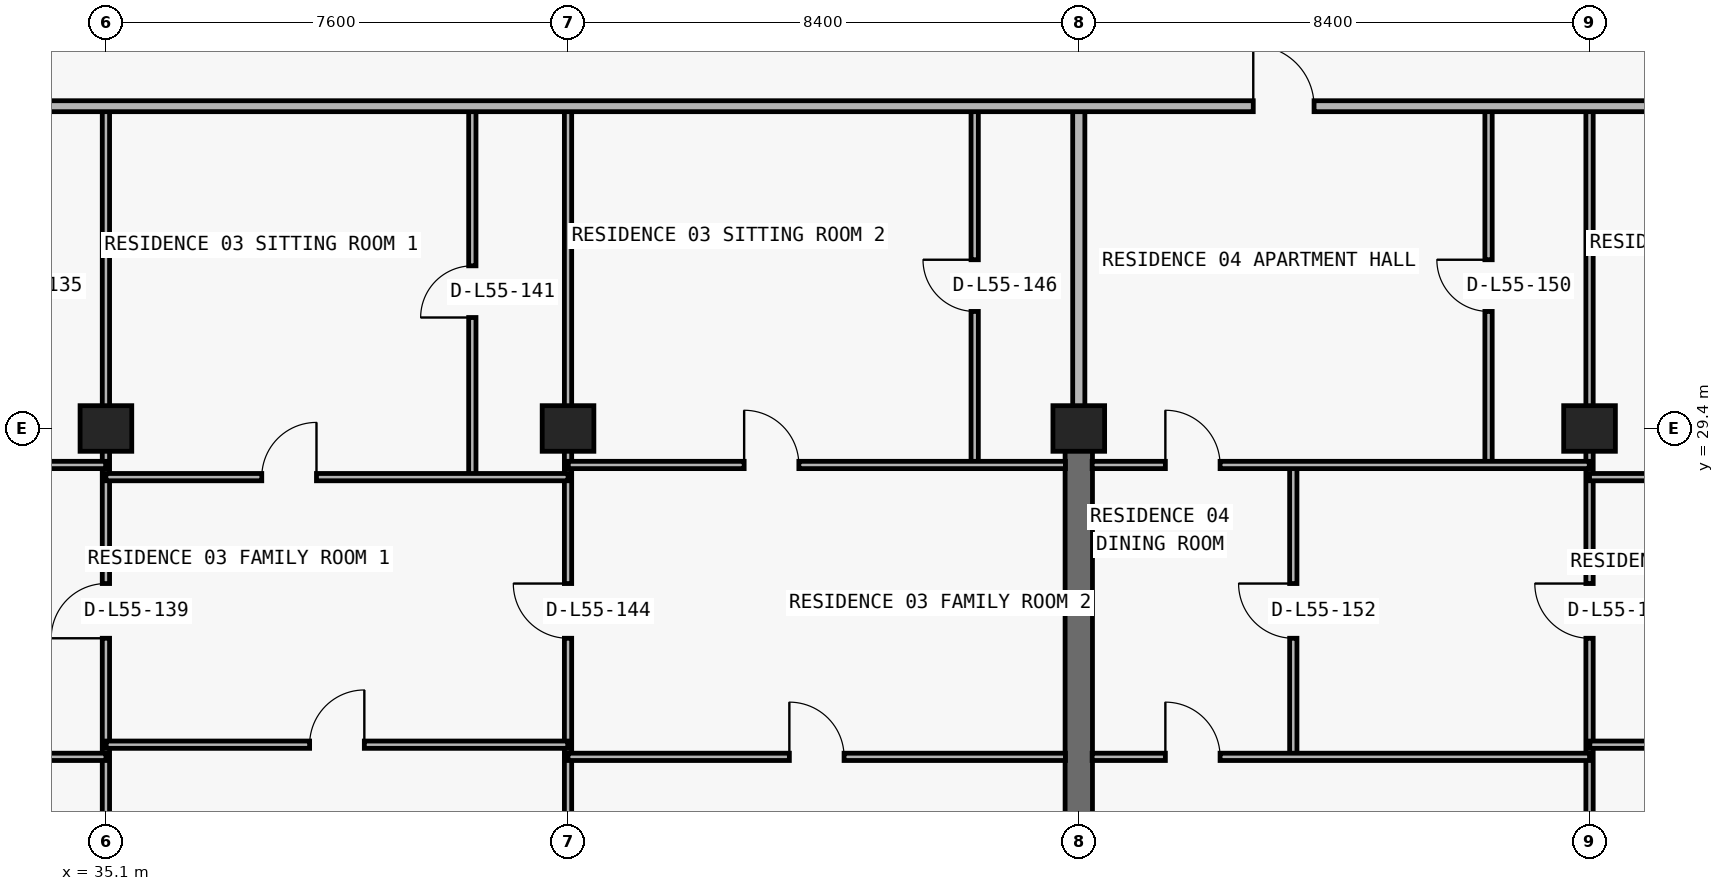
"""IFC4 building model, lengths in metres.
Left out: names, types, materials, properties, quantities, classifications, styles, units other than length and angle.
Written with IfcOpenShell. Run it as: python <this file> out.ifc"""

import sys

from ifc_helpers import new_model, si_unit, direction, frame, frame_2d, origin, origin_2d, place, context, subcontext, project, spatial, rectangle, extrude, element, fill, save


model = new_model("IFC4")
c1 = context("Model", 3, precision=1e-05, world=origin(), true_north=direction((0.0, 1.0)))
c2 = subcontext(c1, "Body", "Model", "MODEL_VIEW")
j1 = project(units=[si_unit("LENGTHUNIT", "METRE"), si_unit("PLANEANGLEUNIT", "RADIAN")], contexts=[c1])
p1 = place(None, origin())
s1 = spatial("IfcSite", under=j1, at=p1, CompositionType="ELEMENT")
p2 = place(p1, origin())
s2 = spatial("IfcBuilding", under=s1, at=p2, CompositionType="ELEMENT")
p3 = place(p2, frame((0.0, 0.0, 198.3)))
s3 = spatial("IfcBuildingStorey", under=s2, at=p3, CompositionType="ELEMENT", Elevation=198.3)
for number, where, z_axis, x_axis in (
    (1, (35.1, 29.4, 0.0), (0.0, 0.0, 1.0), (1.0, 0.0, 0.0)),
    (2, (42.7, 29.4, 0.0), (0.0, 0.0, 1.0), (1.0, 0.0, 0.0)),
    (3, (51.1, 29.4, 0.0), (0.0, 0.0, 1.0), (1.0, 0.0, 0.0)),
    (4, (59.5, 29.4, 0.0), (0.0, 0.0, 1.0), (1.0, 0.0, 0.0)),
):
    element("IfcColumn", number, at=place(p3, frame(where, z_axis=z_axis, x_axis=x_axis)), inside=s3, PredefinedType="COLUMN", context=c2, shape_type="SweptSolid", body=[
        extrude(rectangle(XDim=0.85, YDim=0.75, at=origin_2d()), origin(), (0.0, 0.0, 1.0), 3.05),
    ])
p4 = place(p3, frame((51.1, 20.8, 0.0), z_axis=(0.0, 0.0, 1.0), x_axis=(0.0, 1.0, 0.0)))
e5 = element("IfcWall", 5, at=p4, inside=s3, PredefinedType="SHEAR", context=c2, shape_type="SweptSolid", body=[
    extrude(rectangle(XDim=8.6, YDim=0.45, at=frame_2d((4.3, 0.0))), origin(), (0.0, 0.0, 1.0), 3.05),
])
p5 = place(p3, frame((35.1, 11.24, 0.0), z_axis=(0.0, 0.0, 1.0), x_axis=(0.0, 1.0, 0.0)))
e6 = element("IfcWall", 6, at=p5, inside=s3, PredefinedType="PARTITIONING", context=c2, shape_type="SweptSolid", body=[
    extrude(rectangle(XDim=23.46, YDim=0.12, at=frame_2d((11.73, 0.0))), origin(), (0.0, 0.0, 1.0), 2.263),
])
p6 = place(p5, frame((14.71, 0.0, 0.0)))
e7 = element("IfcOpeningElement", 7, at=p6, cuts=e6, PredefinedType="OPENING", context=c2, shape_type="SweptSolid", body=[
    extrude(rectangle(XDim=0.9, YDim=2.15, at=frame_2d((0.45, 1.075))), frame((0.0, 0.07, 0.0), z_axis=(0.0, -1.0, 0.0), x_axis=(1.0, 0.0, 0.0)), (0.0, 0.0, 1.0), 0.14),
])
p7 = place(p3, frame((41.126, 28.6, 0.0), z_axis=(0.0, 0.0, 1.0), x_axis=(0.0, 1.0, 0.0)))
e8 = element("IfcWall", 8, at=p7, inside=s3, PredefinedType="PARTITIONING", context=c2, shape_type="SweptSolid", body=[
    extrude(rectangle(XDim=6.1, YDim=0.12, at=frame_2d((3.05, 0.0))), origin(), (0.0, 0.0, 1.0), 3.05),
])
p8 = place(p7, frame((2.625, 0.0, 0.0)))
e9 = element("IfcOpeningElement", 9, at=p8, cuts=e8, PredefinedType="OPENING", context=c2, shape_type="SweptSolid", body=[
    extrude(rectangle(XDim=0.85, YDim=2.1, at=frame_2d((0.425, 1.05))), frame((0.0, 0.07, 0.0), z_axis=(0.0, -1.0, 0.0), x_axis=(1.0, 0.0, 0.0)), (0.0, 0.0, 1.0), 0.14),
])
p9 = place(p3, frame((42.7, 11.24, 0.0), z_axis=(0.0, 0.0, 1.0), x_axis=(0.0, 1.0, 0.0)))
e10 = element("IfcWall", 10, at=p9, inside=s3, PredefinedType="PARTITIONING", context=c2, shape_type="SweptSolid", body=[
    extrude(rectangle(XDim=23.46, YDim=0.12, at=frame_2d((11.73, 0.0))), origin(), (0.0, 0.0, 1.0), 2.263),
])
p10 = place(p9, frame((14.71, 0.0, 0.0)))
e11 = element("IfcOpeningElement", 11, at=p10, cuts=e10, PredefinedType="OPENING", context=c2, shape_type="SweptSolid", body=[
    extrude(rectangle(XDim=0.9, YDim=2.15, at=frame_2d((0.45, 1.075))), frame((0.0, 0.07, 0.0), z_axis=(0.0, -1.0, 0.0), x_axis=(1.0, 0.0, 0.0)), (0.0, 0.0, 1.0), 0.14),
])
p11 = place(p3, frame((49.388, 28.8, 0.0), z_axis=(0.0, 0.0, 1.0), x_axis=(0.0, 1.0, 0.0)))
e12 = element("IfcWall", 12, at=p11, inside=s3, PredefinedType="PARTITIONING", context=c2, shape_type="SweptSolid", body=[
    extrude(rectangle(XDim=5.9, YDim=0.12, at=frame_2d((2.95, 0.0))), origin(), (0.0, 0.0, 1.0), 3.05),
])
p12 = place(p11, frame((2.525, 0.0, 0.0)))
e13 = element("IfcOpeningElement", 13, at=p12, cuts=e12, PredefinedType="OPENING", context=c2, shape_type="SweptSolid", body=[
    extrude(rectangle(XDim=0.85, YDim=2.1, at=frame_2d((0.425, 1.05))), frame((0.0, 0.07, 0.0), z_axis=(0.0, -1.0, 0.0), x_axis=(1.0, 0.0, 0.0)), (0.0, 0.0, 1.0), 0.14),
])
p13 = place(p3, frame((51.1, 29.405, 0.0), z_axis=(0.0, 0.0, 1.0), x_axis=(0.0, 1.0, 0.0)))
e14 = element("IfcWall", 14, at=p13, inside=s3, PredefinedType="PARTITIONING", context=c2, shape_type="SweptSolid", body=[
    extrude(rectangle(XDim=5.295, YDim=0.2, at=frame_2d((2.647, 0.0))), origin(), (0.0, 0.0, 1.0), 2.335),
])
p14 = place(p3, frame((54.628, 24.0, 0.0), z_axis=(0.0, 0.0, 1.0), x_axis=(0.0, 1.0, 0.0)))
e15 = element("IfcWall", 15, at=p14, inside=s3, PredefinedType="PARTITIONING", context=c2, shape_type="SweptSolid", body=[
    extrude(rectangle(XDim=4.8, YDim=0.12, at=frame_2d((2.4, 0.0))), origin(), (0.0, 0.0, 1.0), 3.05),
])
p15 = place(p14, frame((1.95, 0.0, 0.0)))
e16 = element("IfcOpeningElement", 16, at=p15, cuts=e15, PredefinedType="OPENING", context=c2, shape_type="SweptSolid", body=[
    extrude(rectangle(XDim=0.9, YDim=2.15, at=frame_2d((0.45, 1.075))), frame((0.0, 0.07, 0.0), z_axis=(0.0, -1.0, 0.0), x_axis=(1.0, 0.0, 0.0)), (0.0, 0.0, 1.0), 0.14),
])
p16 = place(p3, frame((57.839, 28.8, 0.0), z_axis=(0.0, 0.0, 1.0), x_axis=(0.0, 1.0, 0.0)))
e17 = element("IfcWall", 17, at=p16, inside=s3, PredefinedType="PARTITIONING", context=c2, shape_type="SweptSolid", body=[
    extrude(rectangle(XDim=5.9, YDim=0.12, at=frame_2d((2.95, 0.0))), origin(), (0.0, 0.0, 1.0), 3.05),
])
p17 = place(p16, frame((2.525, 0.0, 0.0)))
e18 = element("IfcOpeningElement", 18, at=p17, cuts=e17, PredefinedType="OPENING", context=c2, shape_type="SweptSolid", body=[
    extrude(rectangle(XDim=0.85, YDim=2.1, at=frame_2d((0.425, 1.05))), frame((0.0, 0.07, 0.0), z_axis=(0.0, -1.0, 0.0), x_axis=(1.0, 0.0, 0.0)), (0.0, 0.0, 1.0), 0.14),
])
p18 = place(p3, frame((59.5, 11.24, 0.0), z_axis=(0.0, 0.0, 1.0), x_axis=(0.0, 1.0, 0.0)))
e19 = element("IfcWall", 19, at=p18, inside=s3, PredefinedType="PARTITIONING", context=c2, shape_type="SweptSolid", body=[
    extrude(rectangle(XDim=23.46, YDim=0.12, at=frame_2d((11.73, 0.0))), origin(), (0.0, 0.0, 1.0), 2.263),
])
p19 = place(p18, frame((14.71, 0.0, 0.0)))
e20 = element("IfcOpeningElement", 20, at=p19, cuts=e19, PredefinedType="OPENING", context=c2, shape_type="SweptSolid", body=[
    extrude(rectangle(XDim=0.9, YDim=2.15, at=frame_2d((0.45, 1.075))), frame((0.0, 0.07, 0.0), z_axis=(0.0, -1.0, 0.0), x_axis=(1.0, 0.0, 0.0)), (0.0, 0.0, 1.0), 0.14),
])
p20 = place(p3, frame((26.92, 24.0, 0.0), z_axis=(0.0, 0.0, 1.0), x_axis=(1.0, 0.0, 0.0)))
e21 = element("IfcWall", 21, at=p20, inside=s3, PredefinedType="PARTITIONING", context=c2, shape_type="SweptSolid", body=[
    extrude(rectangle(XDim=8.18, YDim=0.12, at=frame_2d((4.09, 0.0))), origin(), (0.0, 0.0, 1.0), 3.05),
])
p21 = place(p20, frame((1.33, 0.0, 0.0)))
e22 = element("IfcOpeningElement", 22, at=p21, cuts=e21, PredefinedType="OPENING", context=c2, shape_type="SweptSolid", body=[
    extrude(rectangle(XDim=0.9, YDim=2.15, at=frame_2d((0.45, 1.075))), frame((0.0, 0.07, 0.0), z_axis=(0.0, -1.0, 0.0), x_axis=(1.0, 0.0, 0.0)), (0.0, 0.0, 1.0), 0.14),
])
p22 = place(p3, frame((42.7, 24.0, 0.0), z_axis=(0.0, 0.0, 1.0), x_axis=(1.0, 0.0, 0.0)))
e23 = element("IfcWall", 23, at=p22, inside=s3, PredefinedType="PARTITIONING", context=c2, shape_type="SweptSolid", body=[
    extrude(rectangle(XDim=8.18, YDim=0.12, at=frame_2d((4.09, 0.0))), origin(), (0.0, 0.0, 1.0), 3.05),
])
p23 = place(p22, frame((3.64, 0.0, 0.0)))
e24 = element("IfcOpeningElement", 24, at=p23, cuts=e23, PredefinedType="OPENING", context=c2, shape_type="SweptSolid", body=[
    extrude(rectangle(XDim=0.9, YDim=2.15, at=frame_2d((0.45, 1.075))), frame((0.0, 0.07, 0.0), z_axis=(0.0, -1.0, 0.0), x_axis=(1.0, 0.0, 0.0)), (0.0, 0.0, 1.0), 0.14),
])
p24 = place(p3, frame((51.32, 24.0, 0.0), z_axis=(0.0, 0.0, 1.0), x_axis=(1.0, 0.0, 0.0)))
e25 = element("IfcWall", 25, at=p24, inside=s3, PredefinedType="PARTITIONING", context=c2, shape_type="SweptSolid", body=[
    extrude(rectangle(XDim=8.18, YDim=0.12, at=frame_2d((4.09, 0.0))), origin(), (0.0, 0.0, 1.0), 3.05),
])
p25 = place(p24, frame((1.204, 0.0, 0.0)))
e26 = element("IfcOpeningElement", 26, at=p25, cuts=e25, PredefinedType="OPENING", context=c2, shape_type="SweptSolid", body=[
    extrude(rectangle(XDim=0.9, YDim=2.15, at=frame_2d((0.45, 1.075))), frame((0.0, 0.07, 0.0), z_axis=(0.0, -1.0, 0.0), x_axis=(1.0, 0.0, 0.0)), (0.0, 0.0, 1.0), 0.14),
])
p26 = place(p3, frame((35.105, 24.2, 0.0), z_axis=(0.0, 0.0, 1.0), x_axis=(1.0, 0.0, 0.0)))
e27 = element("IfcWall", 27, at=p26, inside=s3, PredefinedType="PARTITIONING", context=c2, shape_type="SweptSolid", body=[
    extrude(rectangle(XDim=7.59, YDim=0.12, at=frame_2d((3.795, 0.0))), origin(), (0.0, 0.0, 1.0), 3.05),
])
p27 = place(p26, frame((3.345, 0.0, 0.0)))
e28 = element("IfcOpeningElement", 28, at=p27, cuts=e27, PredefinedType="OPENING", context=c2, shape_type="SweptSolid", body=[
    extrude(rectangle(XDim=0.9, YDim=2.15, at=frame_2d((0.45, 1.075))), frame((0.0, 0.07, 0.0), z_axis=(0.0, -1.0, 0.0), x_axis=(1.0, 0.0, 0.0)), (0.0, 0.0, 1.0), 0.14),
])
p28 = place(p3, frame((59.505, 24.2, 0.0), z_axis=(0.0, 0.0, 1.0), x_axis=(1.0, 0.0, 0.0)))
e29 = element("IfcWall", 29, at=p28, inside=s3, PredefinedType="PARTITIONING", context=c2, shape_type="SweptSolid", body=[
    extrude(rectangle(XDim=8.195, YDim=0.12, at=frame_2d((4.098, 0.0))), origin(), (0.0, 0.0, 1.0), 3.05),
])
p29 = place(p28, frame((3.647, 0.0, 0.0)))
e30 = element("IfcOpeningElement", 30, at=p29, cuts=e29, PredefinedType="OPENING", context=c2, shape_type="SweptSolid", body=[
    extrude(rectangle(XDim=0.9, YDim=2.15, at=frame_2d((0.45, 1.075))), frame((0.0, 0.07, 0.0), z_axis=(0.0, -1.0, 0.0), x_axis=(1.0, 0.0, 0.0)), (0.0, 0.0, 1.0), 0.14),
])
p30 = place(p3, frame((35.1, 28.6, 0.0), z_axis=(0.0, 0.0, 1.0), x_axis=(1.0, 0.0, 0.0)))
e31 = element("IfcWall", 31, at=p30, inside=s3, PredefinedType="PARTITIONING", context=c2, shape_type="SweptSolid", body=[
    extrude(rectangle(XDim=7.6, YDim=0.12, at=frame_2d((3.8, 0.0))), origin(), (0.0, 0.0, 1.0), 3.05),
])
p31 = place(p30, frame((2.563, 0.0, 0.0)))
e32 = element("IfcOpeningElement", 32, at=p31, cuts=e31, PredefinedType="OPENING", context=c2, shape_type="SweptSolid", body=[
    extrude(rectangle(XDim=0.9, YDim=2.15, at=frame_2d((0.45, 1.075))), frame((0.0, 0.07, 0.0), z_axis=(0.0, -1.0, 0.0), x_axis=(1.0, 0.0, 0.0)), (0.0, 0.0, 1.0), 0.14),
])
p32 = place(p3, frame((59.5, 28.6, 0.0), z_axis=(0.0, 0.0, 1.0), x_axis=(1.0, 0.0, 0.0)))
e33 = element("IfcWall", 33, at=p32, inside=s3, PredefinedType="PARTITIONING", context=c2, shape_type="SweptSolid", body=[
    extrude(rectangle(XDim=8.2, YDim=0.12, at=frame_2d((4.1, 0.0))), origin(), (0.0, 0.0, 1.0), 3.05),
])
p33 = place(p32, frame((2.822, 0.0, 0.0)))
e34 = element("IfcOpeningElement", 34, at=p33, cuts=e33, PredefinedType="OPENING", context=c2, shape_type="SweptSolid", body=[
    extrude(rectangle(XDim=0.9, YDim=2.15, at=frame_2d((0.45, 1.075))), frame((0.0, 0.07, 0.0), z_axis=(0.0, -1.0, 0.0), x_axis=(1.0, 0.0, 0.0)), (0.0, 0.0, 1.0), 0.14),
])
p34 = place(p3, frame((26.92, 28.8, 0.0), z_axis=(0.0, 0.0, 1.0), x_axis=(1.0, 0.0, 0.0)))
e35 = element("IfcWall", 35, at=p34, inside=s3, PredefinedType="PARTITIONING", context=c2, shape_type="SweptSolid", body=[
    extrude(rectangle(XDim=8.175, YDim=0.12, at=frame_2d((4.087, 0.0))), origin(), (0.0, 0.0, 1.0), 3.05),
])
p35 = place(p34, frame((1.33, 0.0, 0.0)))
e36 = element("IfcOpeningElement", 36, at=p35, cuts=e35, PredefinedType="OPENING", context=c2, shape_type="SweptSolid", body=[
    extrude(rectangle(XDim=0.9, YDim=2.15, at=frame_2d((0.45, 1.075))), frame((0.0, 0.07, 0.0), z_axis=(0.0, -1.0, 0.0), x_axis=(1.0, 0.0, 0.0)), (0.0, 0.0, 1.0), 0.14),
])
p36 = place(p3, frame((42.705, 28.8, 0.0), z_axis=(0.0, 0.0, 1.0), x_axis=(1.0, 0.0, 0.0)))
e37 = element("IfcWall", 37, at=p36, inside=s3, PredefinedType="PARTITIONING", context=c2, shape_type="SweptSolid", body=[
    extrude(rectangle(XDim=8.175, YDim=0.12, at=frame_2d((4.087, 0.0))), origin(), (0.0, 0.0, 1.0), 3.05),
])
p37 = place(p36, frame((2.892, 0.0, 0.0)))
e38 = element("IfcOpeningElement", 38, at=p37, cuts=e37, PredefinedType="OPENING", context=c2, shape_type="SweptSolid", body=[
    extrude(rectangle(XDim=0.9, YDim=2.15, at=frame_2d((0.45, 1.075))), frame((0.0, 0.07, 0.0), z_axis=(0.0, -1.0, 0.0), x_axis=(1.0, 0.0, 0.0)), (0.0, 0.0, 1.0), 0.14),
])
p38 = place(p3, frame((51.32, 28.8, 0.0), z_axis=(0.0, 0.0, 1.0), x_axis=(1.0, 0.0, 0.0)))
e39 = element("IfcWall", 39, at=p38, inside=s3, PredefinedType="PARTITIONING", context=c2, shape_type="SweptSolid", body=[
    extrude(rectangle(XDim=8.175, YDim=0.12, at=frame_2d((4.087, 0.0))), origin(), (0.0, 0.0, 1.0), 3.05),
])
p39 = place(p38, frame((1.204, 0.0, 0.0)))
e40 = element("IfcOpeningElement", 40, at=p39, cuts=e39, PredefinedType="OPENING", context=c2, shape_type="SweptSolid", body=[
    extrude(rectangle(XDim=0.9, YDim=2.15, at=frame_2d((0.45, 1.075))), frame((0.0, 0.07, 0.0), z_axis=(0.0, -1.0, 0.0), x_axis=(1.0, 0.0, 0.0)), (0.0, 0.0, 1.0), 0.14),
])
p40 = place(p3, frame((10.105, 34.7, 0.0), z_axis=(0.0, 0.0, 1.0), x_axis=(1.0, 0.0, 0.0)))
e41 = element("IfcWall", 41, at=p40, inside=s3, PredefinedType="PARTITIONING", context=c2, shape_type="SweptSolid", body=[
    extrude(rectangle(XDim=57.595, YDim=0.18, at=frame_2d((28.797, 0.0))), origin(), (0.0, 0.0, 1.0), 3.05),
])
p41 = place(p40, frame((2.365, 0.0, 0.0)))
e42 = element("IfcOpeningElement", 42, at=p41, cuts=e41, PredefinedType="OPENING", context=c2, shape_type="SweptSolid", body=[
    extrude(rectangle(XDim=1.0, YDim=2.2, at=frame_2d((0.5, 1.1))), frame((0.0, 0.1, 0.0), z_axis=(0.0, -1.0, 0.0), x_axis=(1.0, 0.0, 0.0)), (0.0, 0.0, 1.0), 0.2),
])
p42 = place(p40, frame((10.833, 0.0, 0.0)))
e43 = element("IfcOpeningElement", 43, at=p42, cuts=e41, PredefinedType="OPENING", context=c2, shape_type="SweptSolid", body=[
    extrude(rectangle(XDim=1.0, YDim=2.2, at=frame_2d((0.5, 1.1))), frame((0.0, 0.1, 0.0), z_axis=(0.0, -1.0, 0.0), x_axis=(1.0, 0.0, 0.0)), (0.0, 0.0, 1.0), 0.2),
])
p43 = place(p40, frame((19.422, 0.0, 0.0)))
e44 = element("IfcOpeningElement", 44, at=p43, cuts=e41, PredefinedType="OPENING", context=c2, shape_type="SweptSolid", body=[
    extrude(rectangle(XDim=1.0, YDim=2.2, at=frame_2d((0.5, 1.1))), frame((0.0, 0.1, 0.0), z_axis=(0.0, -1.0, 0.0), x_axis=(1.0, 0.0, 0.0)), (0.0, 0.0, 1.0), 0.2),
])
p44 = place(p40, frame((43.865, 0.0, 0.0)))
e45 = element("IfcOpeningElement", 45, at=p44, cuts=e41, PredefinedType="OPENING", context=c2, shape_type="SweptSolid", body=[
    extrude(rectangle(XDim=1.0, YDim=2.2, at=frame_2d((0.5, 1.1))), frame((0.0, 0.1, 0.0), z_axis=(0.0, -1.0, 0.0), x_axis=(1.0, 0.0, 0.0)), (0.0, 0.0, 1.0), 0.2),
])
p45 = place(p6, origin())
e46 = element("IfcDoor", 46, at=p45, inside=s3, OperationType="SINGLE_SWING_LEFT", PredefinedType="DOOR", context=c2, shape_type="SweptSolid", body=[
    extrude(rectangle(XDim=0.9, YDim=2.15, at=frame_2d((0.45, 1.075))), frame((0.0, 0.025, 0.0), z_axis=(0.0, -1.0, 0.0), x_axis=(1.0, 0.0, 0.0)), (0.0, 0.0, 1.0), 0.05),
])
fill(e7, e46)
p46 = place(p31, origin())
e47 = element("IfcDoor", 47, at=p46, inside=s3, OperationType="SINGLE_SWING_RIGHT", PredefinedType="DOOR", context=c2, shape_type="SweptSolid", body=[
    extrude(rectangle(XDim=0.9, YDim=2.15, at=frame_2d((0.45, 1.075))), frame((0.0, 0.025, 0.0), z_axis=(0.0, -1.0, 0.0), x_axis=(1.0, 0.0, 0.0)), (0.0, 0.0, 1.0), 0.05),
])
fill(e32, e47)
p47 = place(p8, origin())
e48 = element("IfcDoor", 48, at=p47, inside=s3, OperationType="SINGLE_SWING_LEFT", PredefinedType="DOOR", context=c2, shape_type="SweptSolid", body=[
    extrude(rectangle(XDim=0.85, YDim=2.1, at=frame_2d((0.425, 1.05))), frame((0.0, 0.025, 0.0), z_axis=(0.0, -1.0, 0.0), x_axis=(1.0, 0.0, 0.0)), (0.0, 0.0, 1.0), 0.05),
])
fill(e9, e48)
p48 = place(p27, origin())
e49 = element("IfcDoor", 49, at=p48, inside=s3, OperationType="SINGLE_SWING_RIGHT", PredefinedType="DOOR", context=c2, shape_type="SweptSolid", body=[
    extrude(rectangle(XDim=0.9, YDim=2.15, at=frame_2d((0.45, 1.075))), frame((0.0, 0.025, 0.0), z_axis=(0.0, -1.0, 0.0), x_axis=(1.0, 0.0, 0.0)), (0.0, 0.0, 1.0), 0.05),
])
fill(e28, e49)
p49 = place(p10, origin())
e50 = element("IfcDoor", 50, at=p49, inside=s3, OperationType="SINGLE_SWING_RIGHT", PredefinedType="DOOR", context=c2, shape_type="SweptSolid", body=[
    extrude(rectangle(XDim=0.9, YDim=2.15, at=frame_2d((0.45, 1.075))), frame((0.0, 0.025, 0.0), z_axis=(0.0, -1.0, 0.0), x_axis=(1.0, 0.0, 0.0)), (0.0, 0.0, 1.0), 0.05),
])
fill(e11, e50)
p50 = place(p37, origin())
e51 = element("IfcDoor", 51, at=p50, inside=s3, OperationType="SINGLE_SWING_LEFT", PredefinedType="DOOR", context=c2, shape_type="SweptSolid", body=[
    extrude(rectangle(XDim=0.9, YDim=2.15, at=frame_2d((0.45, 1.075))), frame((0.0, 0.025, 0.0), z_axis=(0.0, -1.0, 0.0), x_axis=(1.0, 0.0, 0.0)), (0.0, 0.0, 1.0), 0.05),
])
fill(e38, e51)
p51 = place(p12, origin())
e52 = element("IfcDoor", 52, at=p51, inside=s3, OperationType="SINGLE_SWING_RIGHT", PredefinedType="DOOR", context=c2, shape_type="SweptSolid", body=[
    extrude(rectangle(XDim=0.85, YDim=2.1, at=frame_2d((0.425, 1.05))), frame((0.0, 0.025, 0.0), z_axis=(0.0, -1.0, 0.0), x_axis=(1.0, 0.0, 0.0)), (0.0, 0.0, 1.0), 0.05),
])
fill(e13, e52)
p52 = place(p23, origin())
e53 = element("IfcDoor", 53, at=p52, inside=s3, OperationType="SINGLE_SWING_LEFT", PredefinedType="DOOR", context=c2, shape_type="SweptSolid", body=[
    extrude(rectangle(XDim=0.9, YDim=2.15, at=frame_2d((0.45, 1.075))), frame((0.0, 0.025, 0.0), z_axis=(0.0, -1.0, 0.0), x_axis=(1.0, 0.0, 0.0)), (0.0, 0.0, 1.0), 0.05),
])
fill(e24, e53)
p53 = place(p44, origin())
e54 = element("IfcDoor", 54, at=p53, inside=s3, OperationType="SINGLE_SWING_LEFT", PredefinedType="DOOR", context=c2, shape_type="SweptSolid", body=[
    extrude(rectangle(XDim=1.0, YDim=2.2, at=frame_2d((0.5, 1.1))), frame((0.0, 0.025, 0.0), z_axis=(0.0, -1.0, 0.0), x_axis=(1.0, 0.0, 0.0)), (0.0, 0.0, 1.0), 0.05),
])
fill(e45, e54)
p54 = place(p17, origin())
e55 = element("IfcDoor", 55, at=p54, inside=s3, OperationType="SINGLE_SWING_RIGHT", PredefinedType="DOOR", context=c2, shape_type="SweptSolid", body=[
    extrude(rectangle(XDim=0.85, YDim=2.1, at=frame_2d((0.425, 1.05))), frame((0.0, 0.025, 0.0), z_axis=(0.0, -1.0, 0.0), x_axis=(1.0, 0.0, 0.0)), (0.0, 0.0, 1.0), 0.05),
])
fill(e18, e55)
p55 = place(p39, origin())
e56 = element("IfcDoor", 56, at=p55, inside=s3, OperationType="SINGLE_SWING_LEFT", PredefinedType="DOOR", context=c2, shape_type="SweptSolid", body=[
    extrude(rectangle(XDim=0.9, YDim=2.15, at=frame_2d((0.45, 1.075))), frame((0.0, 0.025, 0.0), z_axis=(0.0, -1.0, 0.0), x_axis=(1.0, 0.0, 0.0)), (0.0, 0.0, 1.0), 0.05),
])
fill(e40, e56)
p56 = place(p15, origin())
e57 = element("IfcDoor", 57, at=p56, inside=s3, OperationType="SINGLE_SWING_RIGHT", PredefinedType="DOOR", context=c2, shape_type="SweptSolid", body=[
    extrude(rectangle(XDim=0.9, YDim=2.15, at=frame_2d((0.45, 1.075))), frame((0.0, 0.025, 0.0), z_axis=(0.0, -1.0, 0.0), x_axis=(1.0, 0.0, 0.0)), (0.0, 0.0, 1.0), 0.05),
])
fill(e16, e57)
p57 = place(p25, origin())
e58 = element("IfcDoor", 58, at=p57, inside=s3, OperationType="SINGLE_SWING_LEFT", PredefinedType="DOOR", context=c2, shape_type="SweptSolid", body=[
    extrude(rectangle(XDim=0.9, YDim=2.15, at=frame_2d((0.45, 1.075))), frame((0.0, 0.025, 0.0), z_axis=(0.0, -1.0, 0.0), x_axis=(1.0, 0.0, 0.0)), (0.0, 0.0, 1.0), 0.05),
])
fill(e26, e58)
p58 = place(p19, origin())
e59 = element("IfcDoor", 59, at=p58, inside=s3, OperationType="SINGLE_SWING_RIGHT", PredefinedType="DOOR", context=c2, shape_type="SweptSolid", body=[
    extrude(rectangle(XDim=0.9, YDim=2.15, at=frame_2d((0.45, 1.075))), frame((0.0, 0.025, 0.0), z_axis=(0.0, -1.0, 0.0), x_axis=(1.0, 0.0, 0.0)), (0.0, 0.0, 1.0), 0.05),
])
fill(e20, e59)
save(model, sys.argv[1])
